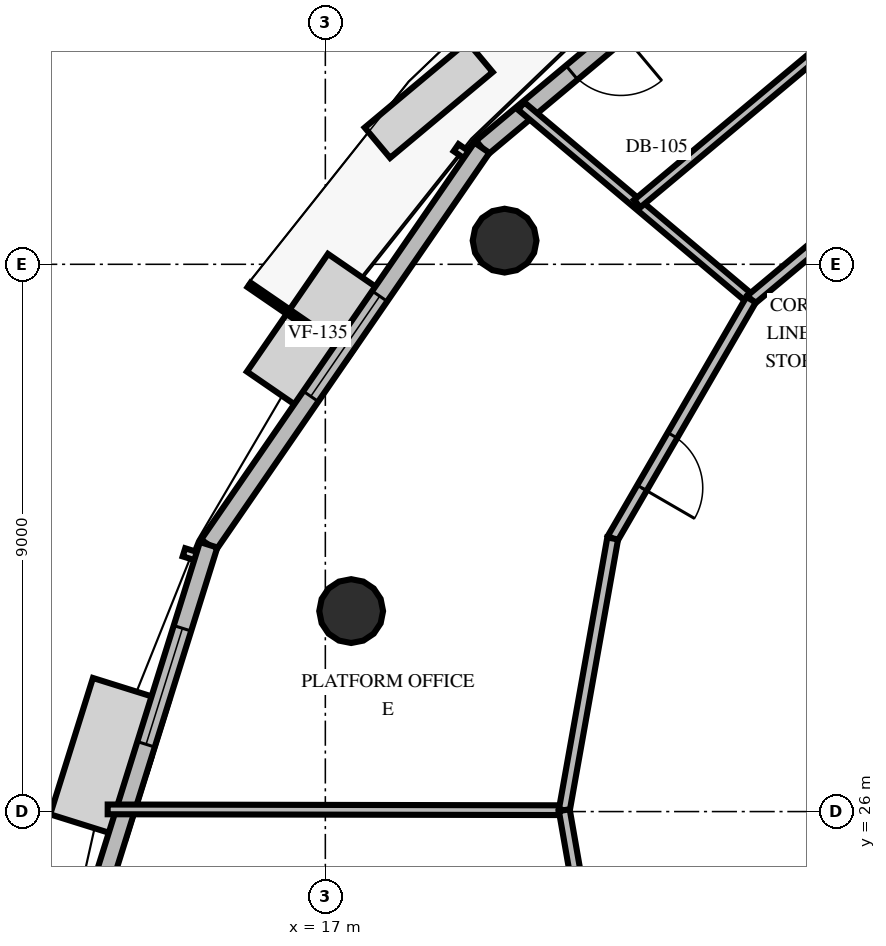
"""IFC4 building model, lengths in metres.
Left out: names, types, materials, properties, quantities, classifications, styles, units other than length and angle.
Written with IfcOpenShell. Run it as: python <this file> out.ifc"""

import sys

from ifc_helpers import new_model, si_unit, direction, frame, frame_2d, origin, origin_2d, place, context, subcontext, project, spatial, rectangle, circle, extrude, element, fill, save


model = new_model("IFC4")
c1 = context("Model", 3, precision=1e-05, world=origin(), true_north=direction((0.0, 1.0)))
c2 = subcontext(c1, "Body", "Model", "MODEL_VIEW")
j1 = project(units=[si_unit("LENGTHUNIT", "METRE"), si_unit("PLANEANGLEUNIT", "RADIAN")], contexts=[c1])
p1 = place(None, origin())
s1 = spatial("IfcSite", under=j1, at=p1, CompositionType="ELEMENT")
p2 = place(p1, origin())
s2 = spatial("IfcBuilding", under=s1, at=p2, CompositionType="ELEMENT")
p3 = place(p2, frame((0.0, 0.0, 198.8)))
s3 = spatial("IfcBuildingStorey", under=s2, at=p3, CompositionType="ELEMENT", Elevation=198.8)
for number, where, z_axis, x_axis in (
    (1, (19.948, 35.389, 0.0), (0.0, 0.0, 1.0), (1.0, 0.0, 0.0)),
    (2, (17.425, 29.297, 0.0), (0.0, 0.0, 1.0), (1.0, 0.0, 0.0)),
):
    element("IfcColumn", number, at=place(p3, frame(where, z_axis=z_axis, x_axis=x_axis)), inside=s3, PredefinedType="COLUMN", context=c2, shape_type="SweptSolid", body=[
        extrude(circle(Radius=0.525, at=origin_2d()), origin(), (0.0, 0.0, 1.0), 3.6),
    ])
p4 = place(p3, frame((25.81, 42.13, 0.0), z_axis=(0.0, 0.0, 1.0), x_axis=(-0.767168792304, -0.641445277569, 0.0)))
e3 = element("IfcWall", 3, at=p4, inside=s3, PredefinedType="SOLIDWALL", context=c2, shape_type="SweptSolid", body=[
    extrude(rectangle(XDim=8.127, YDim=0.3, at=frame_2d((4.063, 0.0))), origin(), (0.0, 0.0, 1.0), 2.66),
])
p5 = place(p4, frame((5.15, 0.0, 0.0)))
e4 = element("IfcOpeningElement", 4, at=p5, cuts=e3, PredefinedType="OPENING", context=c2, shape_type="SweptSolid", body=[
    extrude(rectangle(XDim=1.05, YDim=2.15, at=frame_2d((0.525, 1.075))), frame((0.0, 0.16, 0.0), z_axis=(0.0, -1.0, 0.0), x_axis=(1.0, 0.0, 0.0)), (0.0, 0.0, 1.0), 0.32),
])
p6 = place(p3, frame((19.575, 36.917, 0.0), z_axis=(0.0, 0.0, 1.0), x_axis=(-0.566991439019, -0.823723684302, 0.0)))
e5 = element("IfcWall", 5, at=p6, inside=s3, PredefinedType="SOLIDWALL", context=c2, shape_type="SweptSolid", body=[
    extrude(rectangle(XDim=7.927, YDim=0.3, at=frame_2d((3.964, 0.0))), origin(), (0.0, 0.0, 1.0), 2.66),
])
p7 = place(p6, frame((2.964, 0.0, 0.8)))
e6 = element("IfcOpeningElement", 6, at=p7, cuts=e5, PredefinedType="OPENING", context=c2, shape_type="SweptSolid", body=[
    extrude(rectangle(XDim=2.0, YDim=1.85, at=frame_2d((1.0, 0.925))), frame((0.0, 0.16, 0.0), z_axis=(0.0, -1.0, 0.0), x_axis=(1.0, 0.0, 0.0)), (0.0, 0.0, 1.0), 0.32),
])
p8 = place(p3, frame((15.081, 30.387, 0.0), z_axis=(0.0, 0.0, 1.0), x_axis=(-0.299107357188, -0.954219465781, 0.0)))
e7 = element("IfcWall", 7, at=p8, inside=s3, PredefinedType="SOLIDWALL", context=c2, shape_type="SweptSolid", body=[
    extrude(rectangle(XDim=7.397, YDim=0.3, at=frame_2d((3.699, 0.0))), origin(), (0.0, 0.0, 1.0), 2.66),
])
p9 = place(p8, frame((1.439, 0.0, 0.8)))
e8 = element("IfcOpeningElement", 8, at=p9, cuts=e7, PredefinedType="OPENING", context=c2, shape_type="SweptSolid", body=[
    extrude(rectangle(XDim=2.0, YDim=1.85, at=frame_2d((1.0, 0.925))), frame((0.0, 0.16, 0.0), z_axis=(0.0, -1.0, 0.0), x_axis=(1.0, 0.0, 0.0)), (0.0, 0.0, 1.0), 0.32),
])
p10 = place(p3, frame((24.002, 34.419, 0.0), z_axis=(0.0, 0.0, 1.0), x_axis=(-0.764927848517, 0.644115972914, 0.0)))
e9 = element("IfcWall", 9, at=p10, inside=s3, PredefinedType="PARTITIONING", context=c2, shape_type="SweptSolid", body=[
    extrude(rectangle(XDim=4.943, YDim=0.16, at=frame_2d((2.471, 0.0))), origin(), (0.0, 0.0, 1.0), 2.46),
])
p11 = place(p3, frame((27.485, 37.33, 0.0), z_axis=(0.0, 0.0, 1.0), x_axis=(-0.767179846664, -0.641432056318, 0.0)))
e10 = element("IfcWall", 10, at=p11, inside=s3, PredefinedType="PARTITIONING", context=c2, shape_type="SweptSolid", body=[
    extrude(rectangle(XDim=4.539, YDim=0.18, at=frame_2d((2.27, 0.0))), origin(), (0.0, 0.0, 1.0), 2.46),
])
p12 = place(p3, frame((26.263, 39.454, 0.0), z_axis=(0.0, 0.0, 1.0), x_axis=(-0.76717696823, -0.641435499032, 0.0)))
e11 = element("IfcWall", 11, at=p12, inside=s3, PredefinedType="PARTITIONING", context=c2, shape_type="SweptSolid", body=[
    extrude(rectangle(XDim=5.39, YDim=0.16, at=frame_2d((2.695, 0.0))), origin(), (0.0, 0.0, 1.0), 2.46),
])
p13 = place(p3, frame((20.93, 26.023, 0.0), z_axis=(0.0, 0.0, 1.0), x_axis=(-0.999998458866, 0.001755638103, 0.0)))
e12 = element("IfcWall", 12, at=p13, inside=s3, PredefinedType="PARTITIONING", context=c2, shape_type="SweptSolid", body=[
    extrude(rectangle(XDim=7.509, YDim=0.16, at=frame_2d((3.755, 0.0))), origin(), (0.0, 0.0, 1.0), 2.46),
])
p14 = place(p3, frame((24.002, 34.419, 0.0), z_axis=(0.0, 0.0, 1.0), x_axis=(-0.501504764034, -0.865154883042, 0.0)))
e13 = element("IfcWall", 13, at=p14, inside=s3, PredefinedType="PARTITIONING", context=c2, shape_type="SweptSolid", body=[
    extrude(rectangle(XDim=4.539, YDim=0.18, at=frame_2d((2.27, 0.0))), origin(), (0.0, 0.0, 1.0), 2.46),
])
p15 = place(p14, frame((2.579, 0.0, 0.0)))
e14 = element("IfcOpeningElement", 14, at=p15, cuts=e13, PredefinedType="OPENING", context=c2, shape_type="SweptSolid", body=[
    extrude(rectangle(XDim=1.0, YDim=2.15, at=frame_2d((0.5, 1.075))), frame((0.0, 0.1, 0.0), z_axis=(0.0, -1.0, 0.0), x_axis=(1.0, 0.0, 0.0)), (0.0, 0.0, 1.0), 0.2),
])
p16 = place(p3, frame((21.726, 30.492, 0.0), z_axis=(0.0, 0.0, 1.0), x_axis=(-0.175386685355, -0.984499624479, 0.0)))
e15 = element("IfcWall", 15, at=p16, inside=s3, PredefinedType="PARTITIONING", context=c2, shape_type="SweptSolid", body=[
    extrude(rectangle(XDim=4.539, YDim=0.18, at=frame_2d((2.27, 0.0))), origin(), (0.0, 0.0, 1.0), 2.46),
])
p17 = place(p3, frame((20.93, 26.023, 0.0), z_axis=(0.0, 0.0, 1.0), x_axis=(0.171956284288, -0.985104581399, 0.0)))
e16 = element("IfcWall", 16, at=p17, inside=s3, PredefinedType="PARTITIONING", context=c2, shape_type="SweptSolid", body=[
    extrude(rectangle(XDim=4.539, YDim=0.18, at=frame_2d((2.27, 0.0))), origin(), (0.0, 0.0, 1.0), 2.46),
])
p18 = place(p5, origin())
e17 = element("IfcDoor", 17, at=p18, inside=s3, OperationType="SINGLE_SWING_LEFT", PredefinedType="DOOR", context=c2, shape_type="SweptSolid", body=[
    extrude(rectangle(XDim=1.05, YDim=2.15, at=frame_2d((0.525, 1.075))), frame((0.0, 0.025, 0.0), z_axis=(0.0, -1.0, 0.0), x_axis=(1.0, 0.0, 0.0)), (0.0, 0.0, 1.0), 0.05),
])
fill(e4, e17)
p19 = place(p7, origin())
e18 = element("IfcWindow", 18, at=p19, inside=s3, PartitioningType="SINGLE_PANEL", PredefinedType="WINDOW", context=c2, shape_type="SweptSolid", body=[
    extrude(rectangle(XDim=2.0, YDim=1.85, at=frame_2d((1.0, 0.925))), frame((0.0, 0.03, 0.0), z_axis=(0.0, -1.0, 0.0), x_axis=(1.0, 0.0, 0.0)), (0.0, 0.0, 1.0), 0.06),
])
fill(e6, e18)
p20 = place(p9, origin())
e19 = element("IfcWindow", 19, at=p20, inside=s3, PartitioningType="SINGLE_PANEL", PredefinedType="WINDOW", context=c2, shape_type="SweptSolid", body=[
    extrude(rectangle(XDim=2.0, YDim=1.85, at=frame_2d((1.0, 0.925))), frame((0.0, 0.03, 0.0), z_axis=(0.0, -1.0, 0.0), x_axis=(1.0, 0.0, 0.0)), (0.0, 0.0, 1.0), 0.06),
])
fill(e8, e19)
p21 = place(p15, origin())
e20 = element("IfcDoor", 20, at=p21, inside=s3, OperationType="SINGLE_SWING_RIGHT", PredefinedType="DOOR", context=c2, shape_type="SweptSolid", body=[
    extrude(rectangle(XDim=1.0, YDim=2.15, at=frame_2d((0.5, 1.075))), frame((0.0, 0.025, 0.0), z_axis=(0.0, -1.0, 0.0), x_axis=(1.0, 0.0, 0.0)), (0.0, 0.0, 1.0), 0.05),
])
fill(e14, e20)
save(model, sys.argv[1])
